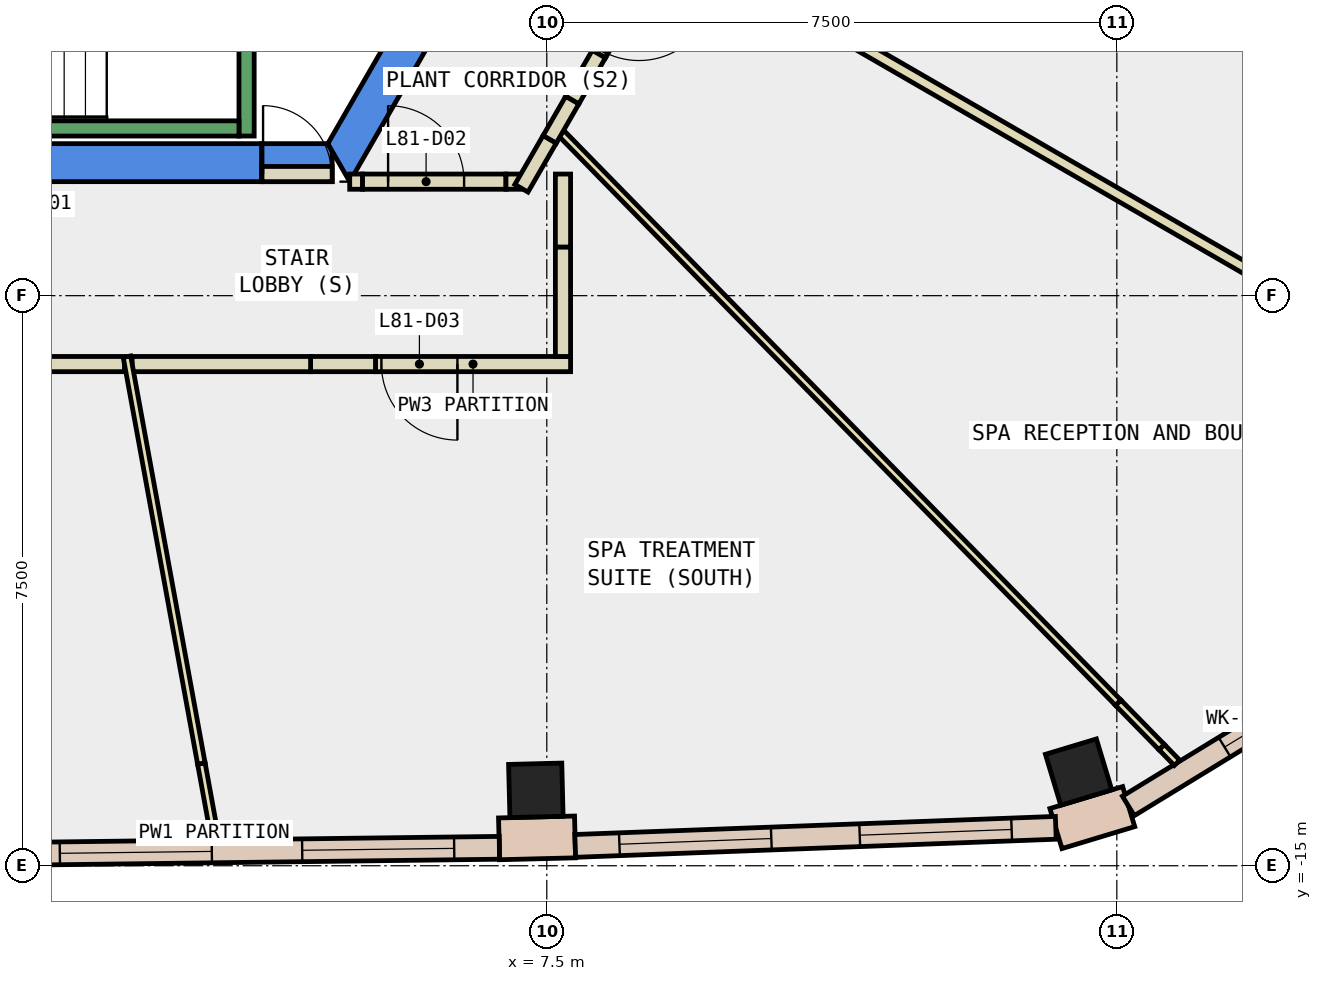
"""IFC4 building model, lengths in metres.
Left out: names, types, materials, properties, quantities, classifications, styles, units other than length and angle.
Written with IfcOpenShell. Run it as: python <this file> out.ifc"""

import sys

from ifc_helpers import new_model, si_unit, direction, frame, frame_2d, origin, origin_2d, place, context, subcontext, project, spatial, polyline, rectangle, outline, extrude, element, fill, save


model = new_model("IFC4")
c1 = context("Model", 3, precision=1e-05, world=origin(), true_north=direction((0.0, 1.0)))
c2 = subcontext(c1, "Body", "Model", "MODEL_VIEW")
j1 = project(units=[si_unit("LENGTHUNIT", "METRE"), si_unit("PLANEANGLEUNIT", "RADIAN")], contexts=[c1])
p1 = place(None, origin())
s1 = spatial("IfcSite", under=j1, at=p1, CompositionType="ELEMENT")
p2 = place(p1, origin())
s2 = spatial("IfcBuilding", under=s1, at=p2, CompositionType="ELEMENT")
p3 = place(p2, frame((0.0, 0.0, 344.9)))
s3 = spatial("IfcBuildingStorey", under=s2, at=p3, CompositionType="ELEMENT", Elevation=344.9)
for number, where, z_axis, x_axis in (
    (1, (7.356, -14.008, -0.35), (0.0, 0.0, 1.0), (1.0, 0.025, 0.0)),
    (2, (14.497, -13.768, -0.35), (0.0, 0.0, 1.0), (0.957, 0.289, 0.0)),
):
    element("IfcColumn", number, at=place(p3, frame(where, z_axis=z_axis, x_axis=x_axis)), inside=s3, PredefinedType="COLUMN", context=c2, shape_type="SweptSolid", body=[
        extrude(rectangle(XDim=0.7, YDim=0.7, at=origin_2d()), origin(), (0.0, 0.0, 1.0), 4.4),
    ])
p4 = place(p3, frame((0.0, 0.0, -0.35)))
e3 = element("IfcWall", 3, at=p4, inside=s3, PredefinedType="SHEAR", context=c2, shape_type="SweptSolid", body=[
    extrude(outline(polyline([(3.75, -6.0), (3.75, -5.5), (-4.619, -5.5), (-4.907, -6.0), (3.75, -6.0)])), origin(), (0.0, 0.0, 1.0), 4.4),
])
p5 = place(p3, frame((0.0, 0.0, 3.6)))
e4 = element("IfcWall", 4, at=p5, inside=s3, PredefinedType="SHEAR", context=c2, shape_type="SweptSolid", body=[
    extrude(outline(polyline([(4.676, -6.0), (4.676, -5.6), (4.619, -5.5), (3.75, -5.5), (3.75, -6.0), (4.676, -6.0)])), origin(), (0.0, 0.0, 1.0), 0.45),
])
p6 = place(p3, frame((0.0, 0.0, -0.35)))
e5 = element("IfcWall", 5, at=p6, inside=s3, PredefinedType="SHEAR", context=c2, shape_type="SweptSolid", body=[
    extrude(outline(polyline([(4.907, -6.0), (9.815, 2.5), (9.238, 2.5), (4.619, -5.5), (4.907, -6.0)])), origin(), (0.0, 0.0, 1.0), 4.4),
])
p7 = place(p3, frame((6.872, -14.646, 0.0), z_axis=(0.0, 0.0, 1.0), x_axis=(0.999690080772, 0.024894626035, 0.0)))
e6 = element("IfcWall", 6, at=p7, inside=s3, PredefinedType="STANDARD", context=c2, shape_type="SweptSolid", body=[
    extrude(rectangle(XDim=1.0, YDim=0.55, at=frame_2d((0.5, 0.0))), origin(), (0.0, 0.0, 1.0), 4.05),
])
p8 = place(p3, frame((14.199, -14.511, 0.0), z_axis=(0.0, 0.0, 1.0), x_axis=(0.957286907321, 0.289139718946, 0.0)))
e7 = element("IfcWall", 7, at=p8, inside=s3, PredefinedType="STANDARD", context=c2, shape_type="SweptSolid", body=[
    extrude(rectangle(XDim=1.0, YDim=0.55, at=frame_2d((0.5, 0.0))), origin(), (0.0, 0.0, 1.0), 4.05),
])
p9 = place(p3, frame((0.499, -14.844, 0.0), z_axis=(0.0, 0.0, 1.0), x_axis=(0.999921164834, 0.012556437292, 0.0)))
e8 = element("IfcWall", 8, at=p9, inside=s3, PredefinedType="STANDARD", context=c2, shape_type="SweptSolid", body=[
    extrude(rectangle(XDim=6.377, YDim=0.3, at=frame_2d((3.189, 0.0))), origin(), (0.0, 0.0, 1.0), 4.05),
])
p10 = place(p9, frame((0.594, 0.0, 0.9)))
e9 = element("IfcOpeningElement", 9, at=p10, cuts=e8, PredefinedType="OPENING", context=c2, shape_type="SweptSolid", body=[
    extrude(rectangle(XDim=2.0, YDim=3.0, at=frame_2d((1.0, 1.5))), frame((0.0, 0.16, 0.0), z_axis=(0.0, -1.0, 0.0), x_axis=(1.0, 0.0, 0.0)), (0.0, 0.0, 1.0), 0.32),
])
p11 = place(p9, frame((3.783, 0.0, 0.9)))
e10 = element("IfcOpeningElement", 10, at=p11, cuts=e8, PredefinedType="OPENING", context=c2, shape_type="SweptSolid", body=[
    extrude(rectangle(XDim=2.0, YDim=3.0, at=frame_2d((1.0, 1.5))), frame((0.0, 0.16, 0.0), z_axis=(0.0, -1.0, 0.0), x_axis=(1.0, 0.0, 0.0)), (0.0, 0.0, 1.0), 0.32),
])
p12 = place(p3, frame((7.874, -14.739, 0.0), z_axis=(0.0, 0.0, 1.0), x_axis=(0.999292132587, 0.03761959262, 0.0)))
e11 = element("IfcWall", 11, at=p12, inside=s3, PredefinedType="STANDARD", context=c2, shape_type="SweptSolid", body=[
    extrude(rectangle(XDim=6.327, YDim=0.3, at=frame_2d((3.164, 0.0))), origin(), (0.0, 0.0, 1.0), 4.05),
])
p13 = place(p12, frame((0.582, 0.0, 0.9)))
e12 = element("IfcOpeningElement", 12, at=p13, cuts=e11, PredefinedType="OPENING", context=c2, shape_type="SweptSolid", body=[
    extrude(rectangle(XDim=2.0, YDim=3.0, at=frame_2d((1.0, 1.5))), frame((0.0, 0.16, 0.0), z_axis=(0.0, -1.0, 0.0), x_axis=(1.0, 0.0, 0.0)), (0.0, 0.0, 1.0), 0.32),
])
p14 = place(p12, frame((3.746, 0.0, 0.9)))
e13 = element("IfcOpeningElement", 13, at=p14, cuts=e11, PredefinedType="OPENING", context=c2, shape_type="SweptSolid", body=[
    extrude(rectangle(XDim=2.0, YDim=3.0, at=frame_2d((1.0, 1.5))), frame((0.0, 0.16, 0.0), z_axis=(0.0, -1.0, 0.0), x_axis=(1.0, 0.0, 0.0)), (0.0, 0.0, 1.0), 0.32),
])
p15 = place(p3, frame((15.152, -14.213, 0.0), z_axis=(0.0, 0.0, 1.0), x_axis=(0.853225151066, 0.521542751448, 0.0)))
e14 = element("IfcWall", 14, at=p15, inside=s3, PredefinedType="STANDARD", context=c2, shape_type="SweptSolid", body=[
    extrude(rectangle(XDim=4.366, YDim=0.3, at=frame_2d((2.183, 0.0))), origin(), (0.0, 0.0, 1.0), 4.05),
])
p16 = place(p15, frame((1.483, 0.0, 0.9)))
e15 = element("IfcOpeningElement", 15, at=p16, cuts=e14, PredefinedType="OPENING", context=c2, shape_type="SweptSolid", body=[
    extrude(rectangle(XDim=1.4, YDim=3.0, at=frame_2d((0.7, 1.5))), frame((0.0, 0.16, 0.0), z_axis=(0.0, -1.0, 0.0), x_axis=(1.0, 0.0, 0.0)), (0.0, 0.0, 1.0), 0.32),
])
p17 = place(p3, frame((19.657, -5.044, 0.0), z_axis=(0.0, 0.0, 1.0), x_axis=(-0.467155191513, 0.884175337274, 0.0)))
e16 = element("IfcWall", 16, at=p17, inside=s3, PredefinedType="STANDARD", context=c2, shape_type="SweptSolid", body=[
    extrude(rectangle(XDim=6.326, YDim=0.3, at=frame_2d((3.163, 0.0))), origin(), (0.0, 0.0, 1.0), 4.05),
])
p18 = place(p17, frame((0.581, 0.0, 0.9)))
e17 = element("IfcOpeningElement", 17, at=p18, cuts=e16, PredefinedType="OPENING", context=c2, shape_type="SweptSolid", body=[
    extrude(rectangle(XDim=2.0, YDim=3.0, at=frame_2d((1.0, 1.5))), frame((0.0, 0.16, 0.0), z_axis=(0.0, -1.0, 0.0), x_axis=(1.0, 0.0, 0.0)), (0.0, 0.0, 1.0), 0.32),
])
p19 = place(p17, frame((3.744, 0.0, 0.9)))
e18 = element("IfcOpeningElement", 18, at=p19, cuts=e16, PredefinedType="OPENING", context=c2, shape_type="SweptSolid", body=[
    extrude(rectangle(XDim=2.0, YDim=3.0, at=frame_2d((1.0, 1.5))), frame((0.0, 0.16, 0.0), z_axis=(0.0, -1.0, 0.0), x_axis=(1.0, 0.0, 0.0)), (0.0, 0.0, 1.0), 0.32),
])
p20 = place(p3, frame((4.907, -6.0, 0.0), z_axis=(0.0, 0.0, 1.0), x_axis=(1.0, 0.0, 0.0)))
e19 = element("IfcWall", 19, at=p20, inside=s3, PredefinedType="PARTITIONING", context=c2, shape_type="SweptSolid", body=[
    extrude(rectangle(XDim=0.169, YDim=0.2, at=frame_2d((0.084, 0.0))), origin(), (0.0, 0.0, 1.0), 2.4),
])
p21 = place(p3, frame((7.813, -8.4, 0.0), z_axis=(0.0, 0.0, 1.0), x_axis=(-1.0, 0.0, 0.0)))
e20 = element("IfcWall", 20, at=p21, inside=s3, PredefinedType="PARTITIONING", context=c2, shape_type="SweptSolid", body=[
    extrude(rectangle(XDim=2.567, YDim=0.2, at=frame_2d((1.283, 0.0))), origin(), (0.0, 0.0, 1.0), 4.05),
])
p22 = place(p21, frame((1.489, 0.0, 0.0)))
e21 = element("IfcOpeningElement", 21, at=p22, cuts=e20, PredefinedType="OPENING", context=c2, shape_type="SweptSolid", body=[
    extrude(rectangle(XDim=1.0, YDim=2.1, at=frame_2d((0.5, 1.05))), frame((0.0, 0.11, 0.0), z_axis=(0.0, -1.0, 0.0), x_axis=(1.0, 0.0, 0.0)), (0.0, 0.0, 1.0), 0.22),
])
p23 = place(p3, frame((7.713, -5.9, 0.0), z_axis=(0.0, 0.0, 1.0), x_axis=(0.0, -1.0, 0.0)))
e22 = element("IfcWall", 22, at=p23, inside=s3, PredefinedType="PARTITIONING", context=c2, shape_type="SweptSolid", body=[
    extrude(rectangle(XDim=0.962, YDim=0.2, at=frame_2d((0.481, 0.0))), origin(), (0.0, 0.0, 1.0), 1.95),
])
p24 = place(p3, frame((1.944, -8.4, 0.0), z_axis=(0.0, 0.0, 1.0), x_axis=(-1.0, 0.0, 0.0)))
e23 = element("IfcWall", 23, at=p24, inside=s3, PredefinedType="PARTITIONING", context=c2, shape_type="SweptSolid", body=[
    extrude(rectangle(XDim=1.331, YDim=0.2, at=frame_2d((0.666, 0.0))), origin(), (0.0, 0.0, 1.0), 4.05),
])
p25 = place(p3, frame((9.106, -2.728, 0.0), z_axis=(0.0, 0.0, 1.0), x_axis=(-0.500246664097, -0.865882945357, 0.0)))
e24 = element("IfcWall", 24, at=p25, inside=s3, PredefinedType="PARTITIONING", context=c2, shape_type="SweptSolid", body=[
    extrude(rectangle(XDim=1.841, YDim=0.2, at=frame_2d((0.92, 0.0))), origin(), (0.0, 0.0, 1.0), 4.05),
])
p26 = place(p25, frame((0.784, 0.0, 0.0)))
e25 = element("IfcOpeningElement", 25, at=p26, cuts=e24, PredefinedType="OPENING", context=c2, shape_type="SweptSolid", body=[
    extrude(rectangle(XDim=1.0, YDim=2.1, at=frame_2d((0.5, 1.05))), frame((0.0, 0.11, 0.0), z_axis=(0.0, -1.0, 0.0), x_axis=(1.0, 0.0, 0.0)), (0.0, 0.0, 1.0), 0.22),
])
p27 = place(p3, frame((3.139, -14.661, 0.0), z_axis=(0.0, 0.0, 1.0), x_axis=(-0.179881613889, 0.983688266162, 0.0)))
e26 = element("IfcWall", 26, at=p27, inside=s3, PredefinedType="PARTITIONING", context=c2, shape_type="SweptSolid", body=[
    extrude(rectangle(XDim=0.194, YDim=0.1, at=frame_2d((0.097, 0.0))), origin(), (0.0, 0.0, 1.0), 4.05),
])
p28 = place(p3, frame((7.624, -5.295, 0.0), z_axis=(0.0, 0.0, 1.0), x_axis=(0.699214658751, -0.714911785458, 0.0)))
e27 = element("IfcWall", 27, at=p28, inside=s3, PredefinedType="PARTITIONING", context=c2, shape_type="SweptSolid", body=[
    extrude(rectangle(XDim=10.576, YDim=0.1, at=frame_2d((5.288, 0.0))), origin(), (0.0, 0.0, 1.0), 4.05),
])
p29 = place(p3, frame((3.75, -5.9, 0.0), z_axis=(0.0, 0.0, 1.0), x_axis=(1.0, 0.0, 0.0)))
e28 = element("IfcWall", 28, at=p29, inside=s3, PredefinedType="PARTITIONING", context=c2, shape_type="SweptSolid", body=[
    extrude(rectangle(XDim=0.926, YDim=0.2, at=frame_2d((0.463, 0.0))), origin(), (0.0, 0.0, 1.0), 2.4),
])
p30 = place(p29, frame((0.017, 0.0, 0.0)))
e29 = element("IfcOpeningElement", 29, at=p30, cuts=e28, PredefinedType="OPENING", context=c2, shape_type="SweptSolid", body=[
    extrude(rectangle(XDim=0.9, YDim=2.1, at=frame_2d((0.45, 1.05))), frame((0.0, 0.11, 0.0), z_axis=(0.0, -1.0, 0.0), x_axis=(1.0, 0.0, 0.0)), (0.0, 0.0, 1.0), 0.22),
])
p31 = place(p3, frame((5.076, -6.0, 0.0), z_axis=(0.0, 0.0, 1.0), x_axis=(1.0, 0.0, 0.0)))
e30 = element("IfcWall", 30, at=p31, inside=s3, PredefinedType="PARTITIONING", context=c2, shape_type="SweptSolid", body=[
    extrude(rectangle(XDim=1.887, YDim=0.2, at=frame_2d((0.943, 0.0))), origin(), (0.0, 0.0, 1.0), 4.05),
])
p32 = place(p31, frame((0.336, 0.0, 0.0)))
e31 = element("IfcOpeningElement", 31, at=p32, cuts=e30, PredefinedType="OPENING", context=c2, shape_type="SweptSolid", body=[
    extrude(rectangle(XDim=1.0, YDim=2.1, at=frame_2d((0.5, 1.05))), frame((0.0, 0.11, 0.0), z_axis=(0.0, -1.0, 0.0), x_axis=(1.0, 0.0, 0.0)), (0.0, 0.0, 1.0), 0.22),
])
p33 = place(p3, frame((6.963, -6.0, 0.0), z_axis=(0.0, 0.0, 1.0), x_axis=(1.0, 0.0, 0.0)))
e32 = element("IfcWall", 32, at=p33, inside=s3, PredefinedType="PARTITIONING", context=c2, shape_type="SweptSolid", body=[
    extrude(rectangle(XDim=0.198, YDim=0.2, at=frame_2d((0.099, 0.0))), origin(), (0.0, 0.0, 1.0), 1.95),
])
p34 = place(p3, frame((5.246, -8.4, 0.0), z_axis=(0.0, 0.0, 1.0), x_axis=(-1.0, 0.0, 0.0)))
e33 = element("IfcWall", 33, at=p34, inside=s3, PredefinedType="PARTITIONING", context=c2, shape_type="SweptSolid", body=[
    extrude(rectangle(XDim=0.854, YDim=0.2, at=frame_2d((0.427, 0.0))), origin(), (0.0, 0.0, 1.0), 1.95),
])
p35 = place(p3, frame((4.392, -8.4, 0.0), z_axis=(0.0, 0.0, 1.0), x_axis=(-1.0, 0.0, 0.0)))
e34 = element("IfcWall", 34, at=p35, inside=s3, PredefinedType="PARTITIONING", context=c2, shape_type="SweptSolid", body=[
    extrude(rectangle(XDim=2.348, YDim=0.2, at=frame_2d((1.174, 0.0))), origin(), (0.0, 0.0, 1.0), 4.05),
])
p36 = place(p3, frame((7.713, -6.862, 0.0), z_axis=(0.0, 0.0, 1.0), x_axis=(0.0, -1.0, 0.0)))
e35 = element("IfcWall", 35, at=p36, inside=s3, PredefinedType="PARTITIONING", context=c2, shape_type="SweptSolid", body=[
    extrude(rectangle(XDim=1.438, YDim=0.2, at=frame_2d((0.719, 0.0))), origin(), (0.0, 0.0, 1.0), 4.05),
])
p37 = place(p3, frame((8.185, -4.322, 0.0), z_axis=(0.0, 0.0, 1.0), x_axis=(-0.500265973451, -0.865871789474, 0.0)))
e36 = element("IfcWall", 36, at=p37, inside=s3, PredefinedType="PARTITIONING", context=c2, shape_type="SweptSolid", body=[
    extrude(rectangle(XDim=0.7, YDim=0.2, at=frame_2d((0.35, 0.0))), origin(), (0.0, 0.0, 1.0), 1.95),
])
p38 = place(p3, frame((7.835, -4.928, 0.0), z_axis=(0.0, 0.0, 1.0), x_axis=(-0.499132035552, -0.866525943689, 0.0)))
e37 = element("IfcWall", 37, at=p38, inside=s3, PredefinedType="PARTITIONING", context=c2, shape_type="SweptSolid", body=[
    extrude(rectangle(XDim=0.597, YDim=0.2, at=frame_2d((0.298, 0.0))), origin(), (0.0, 0.0, 1.0), 4.05),
])
p39 = place(p3, frame((7.537, -5.445, 0.0), z_axis=(0.0, 0.0, 1.0), x_axis=(-0.500529943435, -0.865719224533, 0.0)))
e38 = element("IfcWall", 38, at=p39, inside=s3, PredefinedType="PARTITIONING", context=c2, shape_type="SweptSolid", body=[
    extrude(rectangle(XDim=0.741, YDim=0.2, at=frame_2d((0.371, 0.0))), origin(), (0.0, 0.0, 1.0), 1.95),
])
p40 = place(p3, frame((3.104, -14.47, 0.0), z_axis=(0.0, 0.0, 1.0), x_axis=(-0.179767109298, 0.983709198094, 0.0)))
e39 = element("IfcWall", 39, at=p40, inside=s3, PredefinedType="PARTITIONING", context=c2, shape_type="SweptSolid", body=[
    extrude(rectangle(XDim=0.828, YDim=0.1, at=frame_2d((0.414, 0.0))), origin(), (0.0, 0.0, 1.0), 1.95),
])
p41 = place(p3, frame((2.955, -13.655, 0.0), z_axis=(0.0, 0.0, 1.0), x_axis=(-0.179903930573, 0.983684184972, 0.0)))
e40 = element("IfcWall", 40, at=p41, inside=s3, PredefinedType="PARTITIONING", context=c2, shape_type="SweptSolid", body=[
    extrude(rectangle(XDim=5.442, YDim=0.1, at=frame_2d((2.721, 0.0))), origin(), (0.0, 0.0, 1.0), 4.05),
])
p42 = place(p3, frame((15.019, -12.856, 0.0), z_axis=(0.0, 0.0, 1.0), x_axis=(0.699751841197, -0.714386002622, 0.0)))
e41 = element("IfcWall", 41, at=p42, inside=s3, PredefinedType="PARTITIONING", context=c2, shape_type="SweptSolid", body=[
    extrude(rectangle(XDim=0.817, YDim=0.1, at=frame_2d((0.409, 0.0))), origin(), (0.0, 0.0, 1.0), 1.95),
])
p43 = place(p3, frame((15.591, -13.44, 0.0), z_axis=(0.0, 0.0, 1.0), x_axis=(0.698143623014, -0.715957737332, 0.0)))
e42 = element("IfcWall", 42, at=p43, inside=s3, PredefinedType="PARTITIONING", context=c2, shape_type="SweptSolid", body=[
    extrude(rectangle(XDim=0.288, YDim=0.1, at=frame_2d((0.144, 0.0))), origin(), (0.0, 0.0, 1.0), 4.05),
])
p44 = place(p3, frame((18.416, -8.133, 0.0), z_axis=(0.0, 0.0, 1.0), x_axis=(-0.866013839597, 0.500020029225, 0.0)))
e43 = element("IfcWall", 43, at=p44, inside=s3, PredefinedType="PARTITIONING", context=c2, shape_type="SweptSolid", body=[
    extrude(rectangle(XDim=10.866, YDim=0.15, at=frame_2d((5.433, 0.0))), origin(), (0.0, 0.0, 1.0), 4.05),
])
p45 = place(p3, frame((3.55, -2.667, 0.0), z_axis=(0.0, 0.0, 1.0), x_axis=(0.0, -1.0, 0.0)))
e44 = element("IfcWall", 44, at=p45, inside=s3, PredefinedType="STANDARD", context=c2, shape_type="SweptSolid", body=[
    extrude(rectangle(XDim=2.733, YDim=0.2, at=frame_2d((1.366, 0.0))), origin(), (0.0, 0.0, 1.0), 4.05),
])
p46 = place(p3, frame((-3.45, -5.3, 0.0), z_axis=(0.0, 0.0, 1.0), x_axis=(1.0, 0.0, 0.0)))
e45 = element("IfcWall", 45, at=p46, inside=s3, PredefinedType="STANDARD", context=c2, shape_type="SweptSolid", body=[
    extrude(rectangle(XDim=6.9, YDim=0.2, at=frame_2d((3.45, 0.0))), origin(), (0.0, 0.0, 1.0), 4.05),
])
p47 = place(p10, origin())
e46 = element("IfcWindow", 46, at=p47, inside=s3, PartitioningType="SINGLE_PANEL", PredefinedType="WINDOW", context=c2, shape_type="SweptSolid", body=[
    extrude(rectangle(XDim=2.0, YDim=3.0, at=frame_2d((1.0, 1.5))), frame((0.0, 0.03, 0.0), z_axis=(0.0, -1.0, 0.0), x_axis=(1.0, 0.0, 0.0)), (0.0, 0.0, 1.0), 0.06),
])
fill(e9, e46)
p48 = place(p11, origin())
e47 = element("IfcWindow", 47, at=p48, inside=s3, PartitioningType="SINGLE_PANEL", PredefinedType="WINDOW", context=c2, shape_type="SweptSolid", body=[
    extrude(rectangle(XDim=2.0, YDim=3.0, at=frame_2d((1.0, 1.5))), frame((0.0, 0.03, 0.0), z_axis=(0.0, -1.0, 0.0), x_axis=(1.0, 0.0, 0.0)), (0.0, 0.0, 1.0), 0.06),
])
fill(e10, e47)
p49 = place(p13, origin())
e48 = element("IfcWindow", 48, at=p49, inside=s3, PartitioningType="SINGLE_PANEL", PredefinedType="WINDOW", context=c2, shape_type="SweptSolid", body=[
    extrude(rectangle(XDim=2.0, YDim=3.0, at=frame_2d((1.0, 1.5))), frame((0.0, 0.03, 0.0), z_axis=(0.0, -1.0, 0.0), x_axis=(1.0, 0.0, 0.0)), (0.0, 0.0, 1.0), 0.06),
])
fill(e12, e48)
p50 = place(p14, origin())
e49 = element("IfcWindow", 49, at=p50, inside=s3, PartitioningType="SINGLE_PANEL", PredefinedType="WINDOW", context=c2, shape_type="SweptSolid", body=[
    extrude(rectangle(XDim=2.0, YDim=3.0, at=frame_2d((1.0, 1.5))), frame((0.0, 0.03, 0.0), z_axis=(0.0, -1.0, 0.0), x_axis=(1.0, 0.0, 0.0)), (0.0, 0.0, 1.0), 0.06),
])
fill(e13, e49)
p51 = place(p16, origin())
e50 = element("IfcWindow", 50, at=p51, inside=s3, PartitioningType="SINGLE_PANEL", PredefinedType="WINDOW", context=c2, shape_type="SweptSolid", body=[
    extrude(rectangle(XDim=1.4, YDim=3.0, at=frame_2d((0.7, 1.5))), frame((0.0, 0.03, 0.0), z_axis=(0.0, -1.0, 0.0), x_axis=(1.0, 0.0, 0.0)), (0.0, 0.0, 1.0), 0.06),
])
fill(e15, e50)
p52 = place(p32, origin())
e51 = element("IfcDoor", 51, at=p52, inside=s3, OperationType="SINGLE_SWING_RIGHT", PredefinedType="DOOR", context=c2, shape_type="SweptSolid", body=[
    extrude(rectangle(XDim=1.0, YDim=2.1, at=frame_2d((0.5, 1.05))), frame((0.0, 0.025, 0.0), z_axis=(0.0, -1.0, 0.0), x_axis=(1.0, 0.0, 0.0)), (0.0, 0.0, 1.0), 0.05),
])
fill(e31, e51)
p53 = place(p22, origin())
e52 = element("IfcDoor", 52, at=p53, inside=s3, OperationType="SINGLE_SWING_LEFT", PredefinedType="DOOR", context=c2, shape_type="SweptSolid", body=[
    extrude(rectangle(XDim=1.0, YDim=2.1, at=frame_2d((0.5, 1.05))), frame((0.0, 0.025, 0.0), z_axis=(0.0, -1.0, 0.0), x_axis=(1.0, 0.0, 0.0)), (0.0, 0.0, 1.0), 0.05),
])
fill(e21, e52)
p54 = place(p30, origin())
e53 = element("IfcDoor", 53, at=p54, inside=s3, OperationType="SINGLE_SWING_LEFT", PredefinedType="DOOR", context=c2, shape_type="SweptSolid", body=[
    extrude(rectangle(XDim=0.9, YDim=2.1, at=frame_2d((0.45, 1.05))), frame((0.0, 0.025, 0.0), z_axis=(0.0, -1.0, 0.0), x_axis=(1.0, 0.0, 0.0)), (0.0, 0.0, 1.0), 0.05),
])
fill(e29, e53)
save(model, sys.argv[1])
